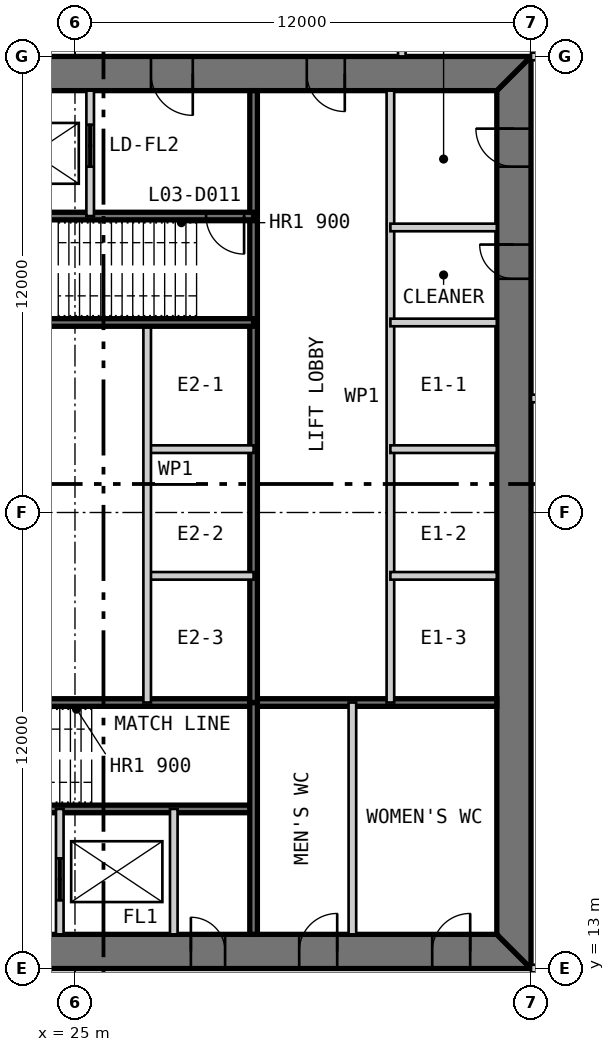
"""IFC4 building model, lengths in metres.
Left out: names, types, materials, properties, quantities, classifications, styles, units other than length and angle.
Written with IfcOpenShell. Run it as: python <this file> out.ifc"""

import sys

from ifc_helpers import new_model, si_unit, direction, frame, frame_2d, origin, place, context, subcontext, project, spatial, polyline, rectangle, outline, extrude, element, fill, save


model = new_model("IFC4")
c1 = context("Model", 3, precision=1e-05, world=origin(), true_north=direction((0.0, 1.0)))
c2 = subcontext(c1, "Body", "Model", "MODEL_VIEW")
j1 = project(units=[si_unit("LENGTHUNIT", "METRE"), si_unit("PLANEANGLEUNIT", "RADIAN")], contexts=[c1])
p1 = place(None, origin())
s1 = spatial("IfcSite", under=j1, at=p1, CompositionType="ELEMENT")
p2 = place(p1, origin())
s2 = spatial("IfcBuilding", under=s1, at=p2, CompositionType="ELEMENT")
p3 = place(p2, frame((0.0, 0.0, 16.6)))
s3 = spatial("IfcBuildingStorey", under=s2, at=p3, CompositionType="ELEMENT", Elevation=16.6)
p4 = place(p3, frame((13.0, 13.45, 0.0), z_axis=(0.0, 0.0, 1.0), x_axis=(1.0, 0.0, 0.0)))
e1 = element("IfcWall", 1, at=p4, inside=s3, PredefinedType="SHEAR", context=c2, shape_type="SweptSolid", body=[
    extrude(outline(polyline([(0.0, -0.45), (24.0, -0.45), (23.1, 0.45), (0.9, 0.45), (0.0, -0.45)])), origin(), (0.0, 0.0, 1.0), 4.8),
])
p5 = place(p4, frame((4.9, 0.0, 0.0)))
e2 = element("IfcOpeningElement", 2, at=p5, cuts=e1, PredefinedType="OPENING", context=c2, shape_type="SweptSolid", body=[
    extrude(rectangle(XDim=1.0, YDim=2.2, at=frame_2d((0.5, 1.1))), frame((0.0, 0.46, 0.0), z_axis=(0.0, -1.0, 0.0), x_axis=(1.0, 0.0, 0.0)), (0.0, 0.0, 1.0), 0.92),
])
p6 = place(p4, frame((8.9, 0.0, 0.0)))
e3 = element("IfcOpeningElement", 3, at=p6, cuts=e1, PredefinedType="OPENING", context=c2, shape_type="SweptSolid", body=[
    extrude(rectangle(XDim=1.1, YDim=2.2, at=frame_2d((0.55, 1.1))), frame((0.0, 0.46, 0.0), z_axis=(0.0, -1.0, 0.0), x_axis=(1.0, 0.0, 0.0)), (0.0, 0.0, 1.0), 0.92),
])
p7 = place(p4, frame((15.05, 0.0, 0.0)))
e4 = element("IfcOpeningElement", 4, at=p7, cuts=e1, PredefinedType="OPENING", context=c2, shape_type="SweptSolid", body=[
    extrude(rectangle(XDim=0.9, YDim=2.2, at=frame_2d((0.45, 1.1))), frame((0.0, 0.46, 0.0), z_axis=(0.0, -1.0, 0.0), x_axis=(1.0, 0.0, 0.0)), (0.0, 0.0, 1.0), 0.92),
])
p8 = place(p4, frame((17.9, 0.0, 0.0)))
e5 = element("IfcOpeningElement", 5, at=p8, cuts=e1, PredefinedType="OPENING", context=c2, shape_type="SweptSolid", body=[
    extrude(rectangle(XDim=1.0, YDim=2.2, at=frame_2d((0.5, 1.1))), frame((0.0, 0.46, 0.0), z_axis=(0.0, -1.0, 0.0), x_axis=(1.0, 0.0, 0.0)), (0.0, 0.0, 1.0), 0.92),
])
p9 = place(p4, frame((21.4, 0.0, 0.0)))
e6 = element("IfcOpeningElement", 6, at=p9, cuts=e1, PredefinedType="OPENING", context=c2, shape_type="SweptSolid", body=[
    extrude(rectangle(XDim=1.0, YDim=2.2, at=frame_2d((0.5, 1.1))), frame((0.0, 0.46, 0.0), z_axis=(0.0, -1.0, 0.0), x_axis=(1.0, 0.0, 0.0)), (0.0, 0.0, 1.0), 0.92),
])
p10 = place(p3, frame((36.55, 13.9, 0.0), z_axis=(0.0, 0.0, 1.0), x_axis=(0.0, 1.0, 0.0)))
e7 = element("IfcWall", 7, at=p10, inside=s3, PredefinedType="SHEAR", context=c2, shape_type="SweptSolid", body=[
    extrude(outline(polyline([(-0.9, -0.45), (23.1, -0.45), (22.2, 0.45), (0.0, 0.45), (-0.9, -0.45)])), origin(), (0.0, 0.0, 1.0), 4.8),
])
p11 = place(p10, frame((20.2, 0.0, 0.0)))
e8 = element("IfcOpeningElement", 8, at=p11, cuts=e7, PredefinedType="OPENING", context=c2, shape_type="SweptSolid", body=[
    extrude(rectangle(XDim=1.0, YDim=2.2, at=frame_2d((0.5, 1.1))), frame((0.0, 0.46, 0.0), z_axis=(0.0, -1.0, 0.0), x_axis=(1.0, 0.0, 0.0)), (0.0, 0.0, 1.0), 0.92),
])
p12 = place(p10, frame((17.25, 0.0, 0.0)))
e9 = element("IfcOpeningElement", 9, at=p12, cuts=e7, PredefinedType="OPENING", context=c2, shape_type="SweptSolid", body=[
    extrude(rectangle(XDim=0.9, YDim=2.2, at=frame_2d((0.45, 1.1))), frame((0.0, 0.46, 0.0), z_axis=(0.0, -1.0, 0.0), x_axis=(1.0, 0.0, 0.0)), (0.0, 0.0, 1.0), 0.92),
])
p13 = place(p3, frame((37.0, 36.55, 0.0), z_axis=(0.0, 0.0, 1.0), x_axis=(-1.0, 0.0, 0.0)))
e10 = element("IfcWall", 10, at=p13, inside=s3, PredefinedType="SHEAR", context=c2, shape_type="SweptSolid", body=[
    extrude(outline(polyline([(0.0, -0.45), (24.0, -0.45), (23.1, 0.45), (0.9, 0.45), (0.0, -0.45)])), origin(), (0.0, 0.0, 1.0), 4.8),
])
p14 = place(p13, frame((4.9, 0.0, 0.0)))
e11 = element("IfcOpeningElement", 11, at=p14, cuts=e10, PredefinedType="OPENING", context=c2, shape_type="SweptSolid", body=[
    extrude(rectangle(XDim=1.0, YDim=2.2, at=frame_2d((0.5, 1.1))), frame((0.0, 0.46, 0.0), z_axis=(0.0, -1.0, 0.0), x_axis=(1.0, 0.0, 0.0)), (0.0, 0.0, 1.0), 0.92),
])
p15 = place(p13, frame((8.9, 0.0, 0.0)))
e12 = element("IfcOpeningElement", 12, at=p15, cuts=e10, PredefinedType="OPENING", context=c2, shape_type="SweptSolid", body=[
    extrude(rectangle(XDim=1.1, YDim=2.2, at=frame_2d((0.55, 1.1))), frame((0.0, 0.46, 0.0), z_axis=(0.0, -1.0, 0.0), x_axis=(1.0, 0.0, 0.0)), (0.0, 0.0, 1.0), 0.92),
])
p16 = place(p13, frame((15.05, 0.0, 0.0)))
e13 = element("IfcOpeningElement", 13, at=p16, cuts=e10, PredefinedType="OPENING", context=c2, shape_type="SweptSolid", body=[
    extrude(rectangle(XDim=0.9, YDim=2.2, at=frame_2d((0.45, 1.1))), frame((0.0, 0.46, 0.0), z_axis=(0.0, -1.0, 0.0), x_axis=(1.0, 0.0, 0.0)), (0.0, 0.0, 1.0), 0.92),
])
p17 = place(p13, frame((17.9, 0.0, 0.0)))
e14 = element("IfcOpeningElement", 14, at=p17, cuts=e10, PredefinedType="OPENING", context=c2, shape_type="SweptSolid", body=[
    extrude(rectangle(XDim=1.0, YDim=2.2, at=frame_2d((0.5, 1.1))), frame((0.0, 0.46, 0.0), z_axis=(0.0, -1.0, 0.0), x_axis=(1.0, 0.0, 0.0)), (0.0, 0.0, 1.0), 0.92),
])
p18 = place(p13, frame((21.4, 0.0, 0.0)))
e15 = element("IfcOpeningElement", 15, at=p18, cuts=e10, PredefinedType="OPENING", context=c2, shape_type="SweptSolid", body=[
    extrude(rectangle(XDim=1.0, YDim=2.2, at=frame_2d((0.5, 1.1))), frame((0.0, 0.46, 0.0), z_axis=(0.0, -1.0, 0.0), x_axis=(1.0, 0.0, 0.0)), (0.0, 0.0, 1.0), 0.92),
])
p19 = place(p3, frame((20.3, 17.2, 0.0), z_axis=(0.0, 0.0, 1.0), x_axis=(1.0, 0.0, 0.0)))
e16 = element("IfcWall", 16, at=p19, inside=s3, PredefinedType="SOLIDWALL", context=c2, shape_type="SweptSolid", body=[
    extrude(rectangle(XDim=9.4, YDim=0.2, at=frame_2d((4.7, 0.0))), origin(), (0.0, 0.0, 1.0), 4.6),
])
p20 = place(p19, frame((0.25, 0.0, 0.0)))
e17 = element("IfcOpeningElement", 17, at=p20, cuts=e16, PredefinedType="OPENING", context=c2, shape_type="SweptSolid", body=[
    extrude(rectangle(XDim=1.0, YDim=2.2, at=frame_2d((0.5, 1.1))), frame((0.0, 0.11, 0.0), z_axis=(0.0, -1.0, 0.0), x_axis=(1.0, 0.0, 0.0)), (0.0, 0.0, 1.0), 0.22),
])
p21 = place(p3, frame((20.3, 20.0, 0.0), z_axis=(0.0, 0.0, 1.0), x_axis=(1.0, 0.0, 0.0)))
e18 = element("IfcWall", 18, at=p21, inside=s3, PredefinedType="SOLIDWALL", context=c2, shape_type="SweptSolid", body=[
    extrude(rectangle(XDim=15.8, YDim=0.2, at=frame_2d((7.9, 0.0))), origin(), (0.0, 0.0, 1.0), 4.6),
])
p22 = place(p3, frame((24.6, 13.9, 0.0), z_axis=(0.0, 0.0, 1.0), x_axis=(0.0, 1.0, 0.0)))
e19 = element("IfcWall", 19, at=p22, inside=s3, PredefinedType="PARTITIONING", context=c2, shape_type="SweptSolid", body=[
    extrude(rectangle(XDim=3.3, YDim=0.2, at=frame_2d((1.65, 0.0))), origin(), (0.0, 0.0, 1.0), 4.6),
])
p23 = place(p22, frame((0.9, 0.0, 0.0)))
e20 = element("IfcOpeningElement", 20, at=p23, cuts=e19, PredefinedType="OPENING", context=c2, shape_type="SweptSolid", body=[
    extrude(rectangle(XDim=1.1, YDim=2.2, at=frame_2d((0.55, 1.1))), frame((0.0, 0.11, 0.0), z_axis=(0.0, -1.0, 0.0), x_axis=(1.0, 0.0, 0.0)), (0.0, 0.0, 1.0), 0.22),
])
p24 = place(p3, frame((27.6, 13.9, 0.0), z_axis=(0.0, 0.0, 1.0), x_axis=(0.0, 1.0, 0.0)))
e21 = element("IfcWall", 21, at=p24, inside=s3, PredefinedType="PARTITIONING", context=c2, shape_type="SweptSolid", body=[
    extrude(rectangle(XDim=3.3, YDim=0.2, at=frame_2d((1.65, 0.0))), origin(), (0.0, 0.0, 1.0), 4.6),
])
p25 = place(p3, frame((29.7, 13.9, 0.0), z_axis=(0.0, 0.0, 1.0), x_axis=(0.0, 1.0, 0.0)))
e22 = element("IfcWall", 22, at=p25, inside=s3, PredefinedType="SOLIDWALL", context=c2, shape_type="SweptSolid", body=[
    extrude(rectangle(XDim=6.1, YDim=0.2, at=frame_2d((3.05, 0.0))), origin(), (0.0, 0.0, 1.0), 4.6),
])
p26 = place(p3, frame((32.3, 13.9, 0.0), z_axis=(0.0, 0.0, 1.0), x_axis=(0.0, 1.0, 0.0)))
e23 = element("IfcWall", 23, at=p26, inside=s3, PredefinedType="PARTITIONING", context=c2, shape_type="SweptSolid", body=[
    extrude(rectangle(XDim=6.1, YDim=0.2, at=frame_2d((3.05, 0.0))), origin(), (0.0, 0.0, 1.0), 4.6),
])
p27 = place(p3, frame((33.3, 36.1, 0.0), z_axis=(0.0, 0.0, 1.0), x_axis=(0.0, -1.0, 0.0)))
e24 = element("IfcWall", 24, at=p27, inside=s3, PredefinedType="PARTITIONING", context=c2, shape_type="SweptSolid", body=[
    extrude(rectangle(XDim=16.1, YDim=0.2, at=frame_2d((8.05, 0.0))), origin(), (0.0, 0.0, 1.0), 4.6),
])
p28 = place(p3, frame((29.7, 36.1, 0.0), z_axis=(0.0, 0.0, 1.0), x_axis=(0.0, -1.0, 0.0)))
e25 = element("IfcWall", 25, at=p28, inside=s3, PredefinedType="SOLIDWALL", context=c2, shape_type="SweptSolid", body=[
    extrude(rectangle(XDim=16.1, YDim=0.2, at=frame_2d((8.05, 0.0))), origin(), (0.0, 0.0, 1.0), 4.6),
])
for number, where, z_axis, x_axis in (
    (26, (36.1, 30.0, 0.0), (0.0, 0.0, 1.0), (-1.0, 0.0, 0.0)),
    (27, (36.1, 26.667, 0.0), (0.0, 0.0, 1.0), (-1.0, 0.0, 0.0)),
    (28, (36.1, 23.333, 0.0), (0.0, 0.0, 1.0), (-1.0, 0.0, 0.0)),
    (29, (29.7, 26.667, 0.0), (0.0, 0.0, 1.0), (-1.0, 0.0, 0.0)),
    (30, (29.7, 23.333, 0.0), (0.0, 0.0, 1.0), (-1.0, 0.0, 0.0)),
):
    element("IfcWall", number, at=place(p3, frame(where, z_axis=z_axis, x_axis=x_axis)), inside=s3, PredefinedType="PARTITIONING", context=c2, shape_type="SweptSolid", body=[
        extrude(rectangle(XDim=2.8, YDim=0.2, at=frame_2d((1.4, 0.0))), origin(), (0.0, 0.0, 1.0), 4.6),
    ])
p29 = place(p3, frame((26.9, 30.0, 0.0), z_axis=(0.0, 0.0, 1.0), x_axis=(0.0, -1.0, 0.0)))
e31 = element("IfcWall", 31, at=p29, inside=s3, PredefinedType="PARTITIONING", context=c2, shape_type="SweptSolid", body=[
    extrude(rectangle(XDim=10.0, YDim=0.2, at=frame_2d((5.0, 0.0))), origin(), (0.0, 0.0, 1.0), 4.6),
])
p30 = place(p3, frame((29.7, 32.8, 0.0), z_axis=(0.0, 0.0, 1.0), x_axis=(-1.0, 0.0, 0.0)))
e32 = element("IfcWall", 32, at=p30, inside=s3, PredefinedType="SOLIDWALL", context=c2, shape_type="SweptSolid", body=[
    extrude(rectangle(XDim=9.4, YDim=0.2, at=frame_2d((4.7, 0.0))), origin(), (0.0, 0.0, 1.0), 4.6),
])
p31 = place(p30, frame((0.25, 0.0, 0.0)))
e33 = element("IfcOpeningElement", 33, at=p31, cuts=e32, PredefinedType="OPENING", context=c2, shape_type="SweptSolid", body=[
    extrude(rectangle(XDim=1.0, YDim=2.2, at=frame_2d((0.5, 1.1))), frame((0.0, 0.11, 0.0), z_axis=(0.0, -1.0, 0.0), x_axis=(1.0, 0.0, 0.0)), (0.0, 0.0, 1.0), 0.22),
])
p32 = place(p3, frame((29.7, 30.0, 0.0), z_axis=(0.0, 0.0, 1.0), x_axis=(-1.0, 0.0, 0.0)))
e34 = element("IfcWall", 34, at=p32, inside=s3, PredefinedType="SOLIDWALL", context=c2, shape_type="SweptSolid", body=[
    extrude(rectangle(XDim=15.8, YDim=0.2, at=frame_2d((7.9, 0.0))), origin(), (0.0, 0.0, 1.0), 4.6),
])
p33 = place(p3, frame((25.4, 36.1, 0.0), z_axis=(0.0, 0.0, 1.0), x_axis=(0.0, -1.0, 0.0)))
e35 = element("IfcWall", 35, at=p33, inside=s3, PredefinedType="PARTITIONING", context=c2, shape_type="SweptSolid", body=[
    extrude(rectangle(XDim=3.3, YDim=0.2, at=frame_2d((1.65, 0.0))), origin(), (0.0, 0.0, 1.0), 4.6),
])
p34 = place(p33, frame((0.9, 0.0, 0.0)))
e36 = element("IfcOpeningElement", 36, at=p34, cuts=e35, PredefinedType="OPENING", context=c2, shape_type="SweptSolid", body=[
    extrude(rectangle(XDim=1.1, YDim=2.2, at=frame_2d((0.55, 1.1))), frame((0.0, 0.11, 0.0), z_axis=(0.0, -1.0, 0.0), x_axis=(1.0, 0.0, 0.0)), (0.0, 0.0, 1.0), 0.22),
])
p35 = place(p3, frame((36.1, 32.5, 0.0), z_axis=(0.0, 0.0, 1.0), x_axis=(-1.0, 0.0, 0.0)))
e37 = element("IfcWall", 37, at=p35, inside=s3, PredefinedType="PARTITIONING", context=c2, shape_type="SweptSolid", body=[
    extrude(rectangle(XDim=2.8, YDim=0.2, at=frame_2d((1.4, 0.0))), origin(), (0.0, 0.0, 1.0), 4.6),
])
p36 = place(p3, frame((33.6, 37.0, 0.0), z_axis=(0.0, 0.0, 1.0), x_axis=(0.0, 1.0, 0.0)))
e38 = element("IfcWall", 38, at=p36, inside=s3, PredefinedType="PARTITIONING", context=c2, shape_type="SweptSolid", body=[
    extrude(rectangle(XDim=6.0, YDim=0.2, at=frame_2d((3.0, 0.0))), origin(), (0.0, 0.0, 1.0), 4.5),
])
p37 = place(p36, frame((2.55, 0.0, 0.0)))
e39 = element("IfcOpeningElement", 39, at=p37, cuts=e38, PredefinedType="OPENING", context=c2, shape_type="SweptSolid", body=[
    extrude(rectangle(XDim=0.9, YDim=2.2, at=frame_2d((0.45, 1.1))), frame((0.0, 0.11, 0.0), z_axis=(0.0, -1.0, 0.0), x_axis=(1.0, 0.0, 0.0)), (0.0, 0.0, 1.0), 0.22),
])
p38 = place(p3, frame((37.0, 13.0, 0.0), z_axis=(0.0, 0.0, 1.0), x_axis=(1.0, 0.0, 0.0)))
e40 = element("IfcWall", 40, at=p38, inside=s3, PredefinedType="PARTITIONING", context=c2, shape_type="SweptSolid", body=[
    extrude(rectangle(XDim=6.0, YDim=0.2, at=frame_2d((3.0, 0.0))), origin(), (0.0, 0.0, 1.0), 3.653),
])
p39 = place(p3, frame((37.0, 28.0, 0.0), z_axis=(0.0, 0.0, 1.0), x_axis=(1.0, 0.0, 0.0)))
e41 = element("IfcWall", 41, at=p39, inside=s3, PredefinedType="PARTITIONING", context=c2, shape_type="SweptSolid", body=[
    extrude(rectangle(XDim=6.0, YDim=0.2, at=frame_2d((3.0, 0.0))), origin(), (0.0, 0.0, 1.0), 4.5),
])
p40 = place(p39, frame((2.1, 0.0, 0.0)))
e42 = element("IfcOpeningElement", 42, at=p40, cuts=e41, PredefinedType="OPENING", context=c2, shape_type="SweptSolid", body=[
    extrude(rectangle(XDim=1.8, YDim=2.4, at=frame_2d((0.9, 1.2))), frame((0.0, 0.11, 0.0), z_axis=(0.0, -1.0, 0.0), x_axis=(1.0, 0.0, 0.0)), (0.0, 0.0, 1.0), 0.22),
])
p41 = place(p3, frame((37.0, 37.0, 0.0), z_axis=(0.0, 0.0, 1.0), x_axis=(1.0, 0.0, 0.0)))
e43 = element("IfcWall", 43, at=p41, inside=s3, PredefinedType="PARTITIONING", context=c2, shape_type="SweptSolid", body=[
    extrude(rectangle(XDim=6.0, YDim=0.2, at=frame_2d((3.0, 0.0))), origin(), (0.0, 0.0, 1.0), 3.653),
])
p42 = place(p7, origin())
e44 = element("IfcDoor", 44, at=p42, inside=s3, OperationType="SINGLE_SWING_LEFT", PredefinedType="DOOR", context=c2, shape_type="SweptSolid", body=[
    extrude(rectangle(XDim=0.9, YDim=2.2, at=frame_2d((0.45, 1.1))), frame((0.0, 0.025, 0.0), z_axis=(0.0, -1.0, 0.0), x_axis=(1.0, 0.0, 0.0)), (0.0, 0.0, 1.0), 0.05),
    extrude(outline(polyline([(0.0, 0.0), (0.04, 0.0), (0.04, 2.16), (0.86, 2.16), (0.86, 0.0), (0.9, 0.0), (0.9, 2.2), (0.0, 2.2), (0.0, 0.0)])), frame((0.0, 0.3, 0.0), z_axis=(0.0, -1.0, 0.0), x_axis=(1.0, 0.0, 0.0)), (0.0, 0.0, 1.0), 0.6),
])
fill(e4, e44)
p43 = place(p8, origin())
e45 = element("IfcDoor", 45, at=p43, inside=s3, OperationType="SINGLE_SWING_RIGHT", PredefinedType="DOOR", context=c2, shape_type="SweptSolid", body=[
    extrude(rectangle(XDim=1.0, YDim=2.2, at=frame_2d((0.5, 1.1))), frame((0.0, 0.025, 0.0), z_axis=(0.0, -1.0, 0.0), x_axis=(1.0, 0.0, 0.0)), (0.0, 0.0, 1.0), 0.05),
    extrude(outline(polyline([(0.0, 0.0), (0.04, 0.0), (0.04, 2.16), (0.96, 2.16), (0.96, 0.0), (1.0, 0.0), (1.0, 2.2), (0.0, 2.2), (0.0, 0.0)])), frame((0.0, 0.3, 0.0), z_axis=(0.0, -1.0, 0.0), x_axis=(1.0, 0.0, 0.0)), (0.0, 0.0, 1.0), 0.6),
])
fill(e5, e45)
p44 = place(p9, origin())
e46 = element("IfcDoor", 46, at=p44, inside=s3, OperationType="SINGLE_SWING_RIGHT", PredefinedType="DOOR", context=c2, shape_type="SweptSolid", body=[
    extrude(rectangle(XDim=1.0, YDim=2.2, at=frame_2d((0.5, 1.1))), frame((0.0, 0.025, 0.0), z_axis=(0.0, -1.0, 0.0), x_axis=(1.0, 0.0, 0.0)), (0.0, 0.0, 1.0), 0.05),
    extrude(outline(polyline([(0.0, 0.0), (0.04, 0.0), (0.04, 2.16), (0.96, 2.16), (0.96, 0.0), (1.0, 0.0), (1.0, 2.2), (0.0, 2.2), (0.0, 0.0)])), frame((0.0, 0.3, 0.0), z_axis=(0.0, -1.0, 0.0), x_axis=(1.0, 0.0, 0.0)), (0.0, 0.0, 1.0), 0.6),
])
fill(e6, e46)
p45 = place(p14, origin())
e47 = element("IfcDoor", 47, at=p45, inside=s3, OperationType="SINGLE_SWING_LEFT", PredefinedType="DOOR", context=c2, shape_type="SweptSolid", body=[
    extrude(rectangle(XDim=1.0, YDim=2.2, at=frame_2d((0.5, 1.1))), frame((0.0, 0.025, 0.0), z_axis=(0.0, -1.0, 0.0), x_axis=(1.0, 0.0, 0.0)), (0.0, 0.0, 1.0), 0.05),
    extrude(outline(polyline([(0.0, 0.0), (0.04, 0.0), (0.04, 2.16), (0.96, 2.16), (0.96, 0.0), (1.0, 0.0), (1.0, 2.2), (0.0, 2.2), (0.0, 0.0)])), frame((0.0, 0.3, 0.0), z_axis=(0.0, -1.0, 0.0), x_axis=(1.0, 0.0, 0.0)), (0.0, 0.0, 1.0), 0.6),
])
fill(e11, e47)
p46 = place(p15, origin())
e48 = element("IfcDoor", 48, at=p46, inside=s3, OperationType="SINGLE_SWING_LEFT", PredefinedType="DOOR", context=c2, shape_type="SweptSolid", body=[
    extrude(rectangle(XDim=1.1, YDim=2.2, at=frame_2d((0.55, 1.1))), frame((0.0, 0.025, 0.0), z_axis=(0.0, -1.0, 0.0), x_axis=(1.0, 0.0, 0.0)), (0.0, 0.0, 1.0), 0.05),
    extrude(outline(polyline([(0.0, 0.0), (0.04, 0.0), (0.04, 2.16), (1.06, 2.16), (1.06, 0.0), (1.1, 0.0), (1.1, 2.2), (0.0, 2.2), (0.0, 0.0)])), frame((0.0, 0.3, 0.0), z_axis=(0.0, -1.0, 0.0), x_axis=(1.0, 0.0, 0.0)), (0.0, 0.0, 1.0), 0.6),
])
fill(e12, e48)
p47 = place(p31, origin())
e49 = element("IfcDoor", 49, at=p47, inside=s3, OperationType="SINGLE_SWING_LEFT", PredefinedType="DOOR", context=c2, shape_type="SweptSolid", body=[
    extrude(rectangle(XDim=1.0, YDim=2.2, at=frame_2d((0.5, 1.1))), frame((0.0, 0.025, 0.0), z_axis=(0.0, -1.0, 0.0), x_axis=(1.0, 0.0, 0.0)), (0.0, 0.0, 1.0), 0.05),
])
fill(e33, e49)
p48 = place(p11, origin())
e50 = element("IfcDoor", 50, at=p48, inside=s3, OperationType="SINGLE_SWING_RIGHT", PredefinedType="DOOR", context=c2, shape_type="SweptSolid", body=[
    extrude(rectangle(XDim=1.0, YDim=2.2, at=frame_2d((0.5, 1.1))), frame((0.0, 0.025, 0.0), z_axis=(0.0, -1.0, 0.0), x_axis=(1.0, 0.0, 0.0)), (0.0, 0.0, 1.0), 0.05),
    extrude(outline(polyline([(0.0, 0.0), (0.04, 0.0), (0.04, 2.16), (0.96, 2.16), (0.96, 0.0), (1.0, 0.0), (1.0, 2.2), (0.0, 2.2), (0.0, 0.0)])), frame((0.0, 0.3, 0.0), z_axis=(0.0, -1.0, 0.0), x_axis=(1.0, 0.0, 0.0)), (0.0, 0.0, 1.0), 0.6),
])
fill(e8, e50)
p49 = place(p12, origin())
e51 = element("IfcDoor", 51, at=p49, inside=s3, OperationType="SINGLE_SWING_RIGHT", PredefinedType="DOOR", context=c2, shape_type="SweptSolid", body=[
    extrude(rectangle(XDim=0.9, YDim=2.2, at=frame_2d((0.45, 1.1))), frame((0.0, 0.025, 0.0), z_axis=(0.0, -1.0, 0.0), x_axis=(1.0, 0.0, 0.0)), (0.0, 0.0, 1.0), 0.05),
    extrude(outline(polyline([(0.0, 0.0), (0.04, 0.0), (0.04, 2.16), (0.86, 2.16), (0.86, 0.0), (0.9, 0.0), (0.9, 2.2), (0.0, 2.2), (0.0, 0.0)])), frame((0.0, 0.3, 0.0), z_axis=(0.0, -1.0, 0.0), x_axis=(1.0, 0.0, 0.0)), (0.0, 0.0, 1.0), 0.6),
])
fill(e9, e51)
p50 = place(p23, origin())
e52 = element("IfcDoor", 52, at=p50, inside=s3, OperationType="DOUBLE_DOOR_SLIDING", PredefinedType="DOOR", context=c2, shape_type="SweptSolid", body=[
    extrude(rectangle(XDim=1.1, YDim=2.2, at=frame_2d((0.55, 1.1))), frame((0.0, 0.025, 0.0), z_axis=(0.0, -1.0, 0.0), x_axis=(1.0, 0.0, 0.0)), (0.0, 0.0, 1.0), 0.05),
])
fill(e20, e52)
p51 = place(p34, origin())
e53 = element("IfcDoor", 53, at=p51, inside=s3, OperationType="DOUBLE_DOOR_SLIDING", PredefinedType="DOOR", context=c2, shape_type="SweptSolid", body=[
    extrude(rectangle(XDim=1.1, YDim=2.2, at=frame_2d((0.55, 1.1))), frame((0.0, 0.025, 0.0), z_axis=(0.0, -1.0, 0.0), x_axis=(1.0, 0.0, 0.0)), (0.0, 0.0, 1.0), 0.05),
])
fill(e36, e53)
save(model, sys.argv[1])
